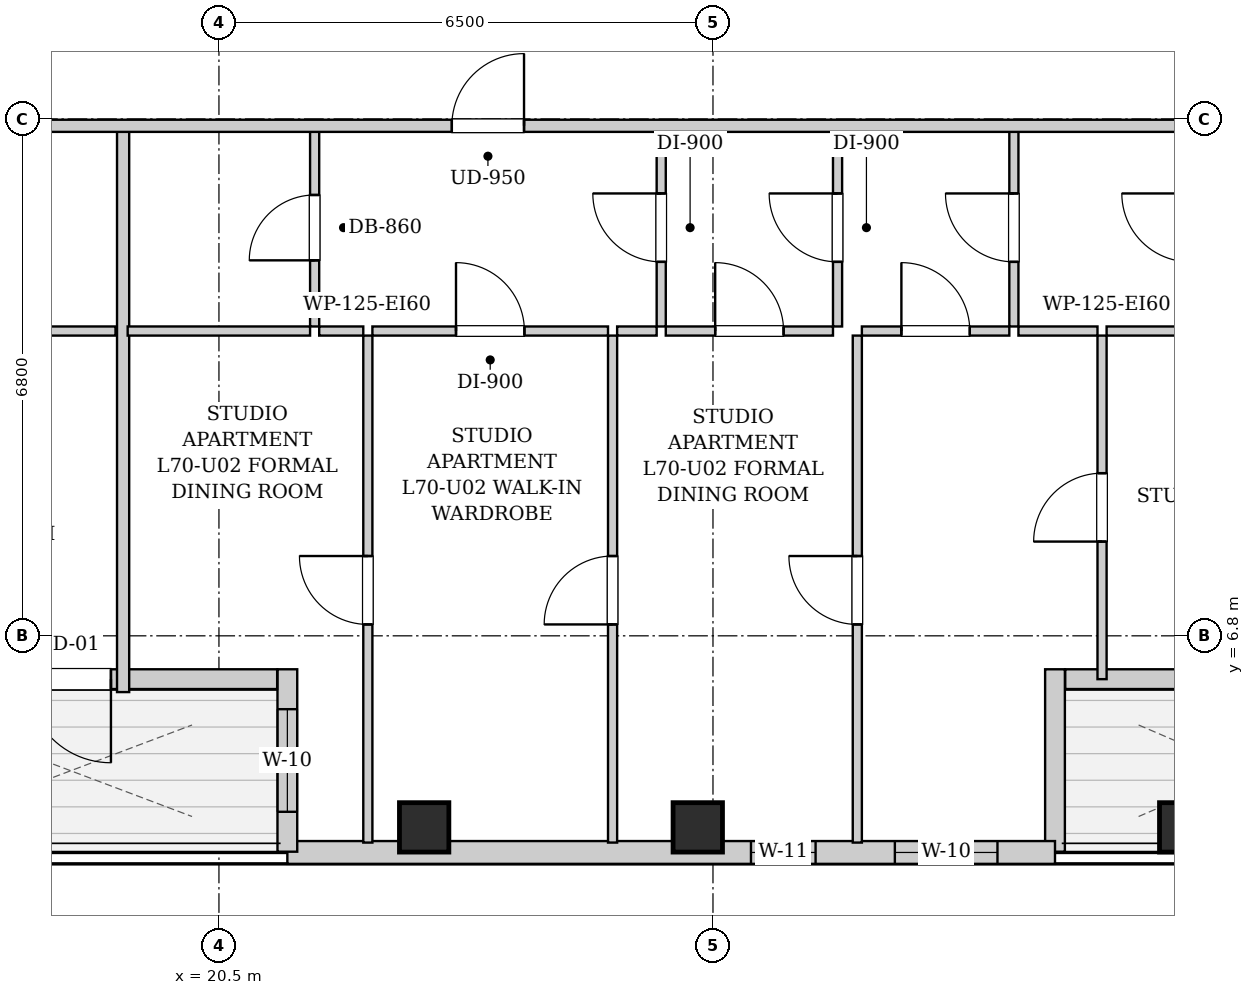
"""IFC4 building model, lengths in metres.
Left out: names, types, materials, properties, quantities, classifications, styles, units other than length and angle.
Written with IfcOpenShell. Run it as: python <this file> out.ifc"""

import sys

from ifc_helpers import new_model, si_unit, direction, frame, frame_2d, origin, origin_2d, place, context, subcontext, project, spatial, rectangle, extrude, element, fill, save


model = new_model("IFC4")
c1 = context("Model", 3, precision=1e-05, world=origin(), true_north=direction((0.0, 1.0)))
c2 = subcontext(c1, "Body", "Model", "MODEL_VIEW")
j1 = project(units=[si_unit("LENGTHUNIT", "METRE"), si_unit("PLANEANGLEUNIT", "RADIAN")], contexts=[c1])
p1 = place(None, origin())
s1 = spatial("IfcSite", under=j1, at=p1, CompositionType="ELEMENT")
p2 = place(p1, origin())
s2 = spatial("IfcBuilding", under=s1, at=p2, CompositionType="ELEMENT")
p3 = place(p2, frame((0.0, 0.0, 241.1)))
s3 = spatial("IfcBuildingStorey", under=s2, at=p3, CompositionType="ELEMENT", Elevation=241.1)
for number, where, z_axis, x_axis in (
    (1, (23.2, 4.28, 0.0), (0.0, 0.0, 1.0), (1.0, 0.0, 0.0)),
    (2, (26.8, 4.28, 0.0), (0.0, 0.0, 1.0), (1.0, 0.0, 0.0)),
    (3, (33.2, 4.28, 0.0), (0.0, 0.0, 1.0), (1.0, 0.0, 0.0)),
):
    element("IfcColumn", number, at=place(p3, frame(where, z_axis=z_axis, x_axis=x_axis)), inside=s3, PredefinedType="COLUMN", context=c2, shape_type="SweptSolid", body=[
        extrude(rectangle(XDim=0.65, YDim=0.65, at=origin_2d()), origin(), (0.0, 0.0, 1.0), 3.4),
    ])
p4 = place(p3, frame((36.366, 6.23, 0.0), z_axis=(0.0, 0.0, 1.0), x_axis=(-1.0, 0.0, 0.0)))
e4 = element("IfcWall", 4, at=p4, inside=s3, PredefinedType="SOLIDWALL", context=c2, shape_type="SweptSolid", body=[
    extrude(rectangle(XDim=4.732, YDim=0.26, at=frame_2d((2.366, 0.0))), origin(), (0.0, 0.0, 1.0), 3.14),
])
p5 = place(p4, frame((1.816, 0.0, 0.0)))
e5 = element("IfcOpeningElement", 5, at=p5, cuts=e4, PredefinedType="OPENING", context=c2, shape_type="SweptSolid", body=[
    extrude(rectangle(XDim=1.1, YDim=2.0, at=frame_2d((0.55, 1.0))), frame((0.0, 0.14, 0.0), z_axis=(0.0, -1.0, 0.0), x_axis=(1.0, 0.0, 0.0)), (0.0, 0.0, 1.0), 0.28),
])
p6 = place(p3, frame((31.5, 6.36, 0.0), z_axis=(0.0, 0.0, 1.0), x_axis=(0.0, -1.0, 0.0)))
e6 = element("IfcWall", 6, at=p6, inside=s3, PredefinedType="SOLIDWALL", context=c2, shape_type="SweptSolid", body=[
    extrude(rectangle(XDim=2.4, YDim=0.26, at=frame_2d((1.2, 0.0))), origin(), (0.0, 0.0, 1.0), 3.14),
])
p7 = place(p3, frame((31.5, 3.95, 0.0), z_axis=(0.0, 0.0, 1.0), x_axis=(-1.0, 0.0, 0.0)))
e7 = element("IfcWall", 7, at=p7, inside=s3, PredefinedType="SOLIDWALL", context=c2, shape_type="SweptSolid", body=[
    extrude(rectangle(XDim=10.1, YDim=0.3, at=frame_2d((5.05, 0.0))), origin(), (0.0, 0.0, 1.0), 3.14),
])
p8 = place(p7, frame((3.15, 0.0, 0.55)))
e8 = element("IfcOpeningElement", 8, at=p8, cuts=e7, PredefinedType="OPENING", context=c2, shape_type="SweptSolid", body=[
    extrude(rectangle(XDim=0.85, YDim=1.2, at=frame_2d((0.425, 0.6))), frame((0.0, 0.16, 0.0), z_axis=(0.0, -1.0, 0.0), x_axis=(1.0, 0.0, 0.0)), (0.0, 0.0, 1.0), 0.32),
])
p9 = place(p7, frame((0.757, 0.0, 0.55)))
e9 = element("IfcOpeningElement", 9, at=p9, cuts=e7, PredefinedType="OPENING", context=c2, shape_type="SweptSolid", body=[
    extrude(rectangle(XDim=1.35, YDim=1.2, at=frame_2d((0.675, 0.6))), frame((0.0, 0.16, 0.0), z_axis=(0.0, -1.0, 0.0), x_axis=(1.0, 0.0, 0.0)), (0.0, 0.0, 1.0), 0.32),
])
p10 = place(p3, frame((21.4, 3.96, 0.0), z_axis=(0.0, 0.0, 1.0), x_axis=(0.0, 1.0, 0.0)))
e10 = element("IfcWall", 10, at=p10, inside=s3, PredefinedType="SOLIDWALL", context=c2, shape_type="SweptSolid", body=[
    extrude(rectangle(XDim=2.4, YDim=0.26, at=frame_2d((1.2, 0.0))), origin(), (0.0, 0.0, 1.0), 3.14),
])
p11 = place(p10, frame((0.525, 0.0, 0.55)))
e11 = element("IfcOpeningElement", 11, at=p11, cuts=e10, PredefinedType="OPENING", context=c2, shape_type="SweptSolid", body=[
    extrude(rectangle(XDim=1.35, YDim=1.2, at=frame_2d((0.675, 0.6))), frame((0.0, 0.14, 0.0), z_axis=(0.0, -1.0, 0.0), x_axis=(1.0, 0.0, 0.0)), (0.0, 0.0, 1.0), 0.28),
])
p12 = place(p3, frame((21.266, 6.23, 0.0), z_axis=(0.0, 0.0, 1.0), x_axis=(-1.0, 0.0, 0.0)))
e12 = element("IfcWall", 12, at=p12, inside=s3, PredefinedType="SOLIDWALL", context=c2, shape_type="SweptSolid", body=[
    extrude(rectangle(XDim=5.432, YDim=0.26, at=frame_2d((2.716, 0.0))), origin(), (0.0, 0.0, 1.0), 3.14),
])
p13 = place(p12, frame((2.187, 0.0, 0.0)))
e13 = element("IfcOpeningElement", 13, at=p13, cuts=e12, PredefinedType="OPENING", context=c2, shape_type="SweptSolid", body=[
    extrude(rectangle(XDim=1.1, YDim=2.0, at=frame_2d((0.55, 1.0))), frame((0.0, 0.14, 0.0), z_axis=(0.0, -1.0, 0.0), x_axis=(1.0, 0.0, 0.0)), (0.0, 0.0, 1.0), 0.28),
])
p14 = place(p3, frame((15.15, 10.81, 0.0), z_axis=(0.0, 0.0, 1.0), x_axis=(1.0, 0.0, 0.0)))
e14 = element("IfcWall", 14, at=p14, inside=s3, PredefinedType="PARTITIONING", context=c2, shape_type="SweptSolid", body=[
    extrude(rectangle(XDim=3.989, YDim=0.12, at=frame_2d((1.995, 0.0))), origin(), (0.0, 0.0, 1.0), 3.14),
])
p15 = place(p14, frame((1.544, 0.0, 0.0)))
e15 = element("IfcOpeningElement", 15, at=p15, cuts=e14, PredefinedType="OPENING", context=c2, shape_type="SweptSolid", body=[
    extrude(rectangle(XDim=0.9, YDim=2.05, at=frame_2d((0.45, 1.025))), frame((0.0, 0.07, 0.0), z_axis=(0.0, -1.0, 0.0), x_axis=(1.0, 0.0, 0.0)), (0.0, 0.0, 1.0), 0.14),
])
p16 = place(p3, frame((19.239, 6.06, 0.0), z_axis=(0.0, 0.0, 1.0), x_axis=(0.0, 1.0, 0.0)))
e16 = element("IfcWall", 16, at=p16, inside=s3, PredefinedType="PARTITIONING", context=c2, shape_type="SweptSolid", body=[
    extrude(rectangle(XDim=7.41, YDim=0.16, at=frame_2d((3.705, 0.0))), origin(), (0.0, 0.0, 1.0), 3.14),
])
p17 = place(p3, frame((21.759, 10.87, 0.0), z_axis=(0.0, 0.0, 1.0), x_axis=(0.0, 1.0, 0.0)))
e17 = element("IfcWall", 17, at=p17, inside=s3, PredefinedType="PARTITIONING", context=c2, shape_type="SweptSolid", body=[
    extrude(rectangle(XDim=2.6, YDim=0.12, at=frame_2d((1.3, 0.0))), origin(), (0.0, 0.0, 1.0), 3.14),
])
p18 = place(p17, frame((0.87, 0.0, 0.0)))
e18 = element("IfcOpeningElement", 18, at=p18, cuts=e17, PredefinedType="OPENING", context=c2, shape_type="SweptSolid", body=[
    extrude(rectangle(XDim=0.86, YDim=2.05, at=frame_2d((0.43, 1.025))), frame((0.0, 0.07, 0.0), z_axis=(0.0, -1.0, 0.0), x_axis=(1.0, 0.0, 0.0)), (0.0, 0.0, 1.0), 0.14),
])
p19 = place(p3, frame((19.299, 10.81, 0.0), z_axis=(0.0, 0.0, 1.0), x_axis=(1.0, 0.0, 0.0)))
e19 = element("IfcWall", 19, at=p19, inside=s3, PredefinedType="PARTITIONING", context=c2, shape_type="SweptSolid", body=[
    extrude(rectangle(XDim=2.4, YDim=0.12, at=frame_2d((1.2, 0.0))), origin(), (0.0, 0.0, 1.0), 3.14),
])
p20 = place(p3, frame((26.319, 10.87, 0.0), z_axis=(0.0, 0.0, 1.0), x_axis=(0.0, 1.0, 0.0)))
e20 = element("IfcWall", 20, at=p20, inside=s3, PredefinedType="PARTITIONING", context=c2, shape_type="SweptSolid", body=[
    extrude(rectangle(XDim=2.6, YDim=0.12, at=frame_2d((1.3, 0.0))), origin(), (0.0, 0.0, 1.0), 3.14),
])
p21 = place(p20, frame((0.85, 0.0, 0.0)))
e21 = element("IfcOpeningElement", 21, at=p21, cuts=e20, PredefinedType="OPENING", context=c2, shape_type="SweptSolid", body=[
    extrude(rectangle(XDim=0.9, YDim=2.05, at=frame_2d((0.45, 1.025))), frame((0.0, 0.07, 0.0), z_axis=(0.0, -1.0, 0.0), x_axis=(1.0, 0.0, 0.0)), (0.0, 0.0, 1.0), 0.14),
])
p22 = place(p3, frame((21.819, 10.81, 0.0), z_axis=(0.0, 0.0, 1.0), x_axis=(1.0, 0.0, 0.0)))
e22 = element("IfcWall", 22, at=p22, inside=s3, PredefinedType="PARTITIONING", context=c2, shape_type="SweptSolid", body=[
    extrude(rectangle(XDim=0.58, YDim=0.12, at=frame_2d((0.29, 0.0))), origin(), (0.0, 0.0, 1.0), 3.14),
])
p23 = place(p3, frame((22.519, 10.81, 0.0), z_axis=(0.0, 0.0, 1.0), x_axis=(1.0, 0.0, 0.0)))
e23 = element("IfcWall", 23, at=p23, inside=s3, PredefinedType="PARTITIONING", context=c2, shape_type="SweptSolid", body=[
    extrude(rectangle(XDim=3.1, YDim=0.12, at=frame_2d((1.55, 0.0))), origin(), (0.0, 0.0, 1.0), 3.14),
])
p24 = place(p23, frame((1.1, 0.0, 0.0)))
e24 = element("IfcOpeningElement", 24, at=p24, cuts=e23, PredefinedType="OPENING", context=c2, shape_type="SweptSolid", body=[
    extrude(rectangle(XDim=0.9, YDim=2.05, at=frame_2d((0.45, 1.025))), frame((0.0, 0.07, 0.0), z_axis=(0.0, -1.0, 0.0), x_axis=(1.0, 0.0, 0.0)), (0.0, 0.0, 1.0), 0.14),
])
p25 = place(p3, frame((25.739, 10.81, 0.0), z_axis=(0.0, 0.0, 1.0), x_axis=(1.0, 0.0, 0.0)))
e25 = element("IfcWall", 25, at=p25, inside=s3, PredefinedType="PARTITIONING", context=c2, shape_type="SweptSolid", body=[
    extrude(rectangle(XDim=0.52, YDim=0.12, at=frame_2d((0.26, 0.0))), origin(), (0.0, 0.0, 1.0), 3.14),
])
p26 = place(p3, frame((28.639, 10.87, 0.0), z_axis=(0.0, 0.0, 1.0), x_axis=(0.0, 1.0, 0.0)))
e26 = element("IfcWall", 26, at=p26, inside=s3, PredefinedType="PARTITIONING", context=c2, shape_type="SweptSolid", body=[
    extrude(rectangle(XDim=2.6, YDim=0.12, at=frame_2d((1.3, 0.0))), origin(), (0.0, 0.0, 1.0), 3.14),
])
p27 = place(p26, frame((0.85, 0.0, 0.0)))
e27 = element("IfcOpeningElement", 27, at=p27, cuts=e26, PredefinedType="OPENING", context=c2, shape_type="SweptSolid", body=[
    extrude(rectangle(XDim=0.9, YDim=2.05, at=frame_2d((0.45, 1.025))), frame((0.0, 0.07, 0.0), z_axis=(0.0, -1.0, 0.0), x_axis=(1.0, 0.0, 0.0)), (0.0, 0.0, 1.0), 0.14),
])
p28 = place(p3, frame((26.379, 10.81, 0.0), z_axis=(0.0, 0.0, 1.0), x_axis=(1.0, 0.0, 0.0)))
e28 = element("IfcWall", 28, at=p28, inside=s3, PredefinedType="PARTITIONING", context=c2, shape_type="SweptSolid", body=[
    extrude(rectangle(XDim=2.2, YDim=0.12, at=frame_2d((1.1, 0.0))), origin(), (0.0, 0.0, 1.0), 3.14),
])
p29 = place(p28, frame((0.65, 0.0, 0.0)))
e29 = element("IfcOpeningElement", 29, at=p29, cuts=e28, PredefinedType="OPENING", context=c2, shape_type="SweptSolid", body=[
    extrude(rectangle(XDim=0.9, YDim=2.05, at=frame_2d((0.45, 1.025))), frame((0.0, 0.07, 0.0), z_axis=(0.0, -1.0, 0.0), x_axis=(1.0, 0.0, 0.0)), (0.0, 0.0, 1.0), 0.14),
])
p30 = place(p3, frame((30.959, 10.87, 0.0), z_axis=(0.0, 0.0, 1.0), x_axis=(0.0, 1.0, 0.0)))
e30 = element("IfcWall", 30, at=p30, inside=s3, PredefinedType="PARTITIONING", context=c2, shape_type="SweptSolid", body=[
    extrude(rectangle(XDim=2.6, YDim=0.12, at=frame_2d((1.3, 0.0))), origin(), (0.0, 0.0, 1.0), 3.14),
])
p31 = place(p30, frame((0.85, 0.0, 0.0)))
e31 = element("IfcOpeningElement", 31, at=p31, cuts=e30, PredefinedType="OPENING", context=c2, shape_type="SweptSolid", body=[
    extrude(rectangle(XDim=0.9, YDim=2.05, at=frame_2d((0.45, 1.025))), frame((0.0, 0.07, 0.0), z_axis=(0.0, -1.0, 0.0), x_axis=(1.0, 0.0, 0.0)), (0.0, 0.0, 1.0), 0.14),
])
p32 = place(p3, frame((28.959, 10.81, 0.0), z_axis=(0.0, 0.0, 1.0), x_axis=(1.0, 0.0, 0.0)))
e32 = element("IfcWall", 32, at=p32, inside=s3, PredefinedType="PARTITIONING", context=c2, shape_type="SweptSolid", body=[
    extrude(rectangle(XDim=1.94, YDim=0.12, at=frame_2d((0.97, 0.0))), origin(), (0.0, 0.0, 1.0), 3.14),
])
p33 = place(p32, frame((0.52, 0.0, 0.0)))
e33 = element("IfcOpeningElement", 33, at=p33, cuts=e32, PredefinedType="OPENING", context=c2, shape_type="SweptSolid", body=[
    extrude(rectangle(XDim=0.9, YDim=2.05, at=frame_2d((0.45, 1.025))), frame((0.0, 0.07, 0.0), z_axis=(0.0, -1.0, 0.0), x_axis=(1.0, 0.0, 0.0)), (0.0, 0.0, 1.0), 0.14),
])
for number, where, z_axis, x_axis in (
    (34, (31.019, 10.81, 0.0), (0.0, 0.0, 1.0), (1.0, 0.0, 0.0)),
    (35, (32.179, 10.81, 0.0), (0.0, 0.0, 1.0), (1.0, 0.0, 0.0)),
):
    element("IfcWall", number, at=place(p3, frame(where, z_axis=z_axis, x_axis=x_axis)), inside=s3, PredefinedType="PARTITIONING", context=c2, shape_type="SweptSolid", body=[
        extrude(rectangle(XDim=1.04, YDim=0.12, at=frame_2d((0.52, 0.0))), origin(), (0.0, 0.0, 1.0), 3.14),
    ])
p34 = place(p3, frame((22.459, 4.08, 0.0), z_axis=(0.0, 0.0, 1.0), x_axis=(0.0, 1.0, 0.0)))
e36 = element("IfcWall", 36, at=p34, inside=s3, PredefinedType="PARTITIONING", context=c2, shape_type="SweptSolid", body=[
    extrude(rectangle(XDim=6.67, YDim=0.12, at=frame_2d((3.335, 0.0))), origin(), (0.0, 0.0, 1.0), 3.14),
])
p35 = place(p34, frame((2.87, 0.0, 0.0)))
e37 = element("IfcOpeningElement", 37, at=p35, cuts=e36, PredefinedType="OPENING", context=c2, shape_type="SweptSolid", body=[
    extrude(rectangle(XDim=0.9, YDim=2.05, at=frame_2d((0.45, 1.025))), frame((0.0, 0.07, 0.0), z_axis=(0.0, -1.0, 0.0), x_axis=(1.0, 0.0, 0.0)), (0.0, 0.0, 1.0), 0.14),
])
p36 = place(p3, frame((25.679, 4.08, 0.0), z_axis=(0.0, 0.0, 1.0), x_axis=(0.0, 1.0, 0.0)))
e38 = element("IfcWall", 38, at=p36, inside=s3, PredefinedType="PARTITIONING", context=c2, shape_type="SweptSolid", body=[
    extrude(rectangle(XDim=6.67, YDim=0.12, at=frame_2d((3.335, 0.0))), origin(), (0.0, 0.0, 1.0), 3.14),
])
p37 = place(p36, frame((2.87, 0.0, 0.0)))
e39 = element("IfcOpeningElement", 39, at=p37, cuts=e38, PredefinedType="OPENING", context=c2, shape_type="SweptSolid", body=[
    extrude(rectangle(XDim=0.9, YDim=2.05, at=frame_2d((0.45, 1.025))), frame((0.0, 0.07, 0.0), z_axis=(0.0, -1.0, 0.0), x_axis=(1.0, 0.0, 0.0)), (0.0, 0.0, 1.0), 0.14),
])
p38 = place(p3, frame((28.899, 4.08, 0.0), z_axis=(0.0, 0.0, 1.0), x_axis=(0.0, 1.0, 0.0)))
e40 = element("IfcWall", 40, at=p38, inside=s3, PredefinedType="PARTITIONING", context=c2, shape_type="SweptSolid", body=[
    extrude(rectangle(XDim=6.67, YDim=0.12, at=frame_2d((3.335, 0.0))), origin(), (0.0, 0.0, 1.0), 3.14),
])
p39 = place(p38, frame((2.87, 0.0, 0.0)))
e41 = element("IfcOpeningElement", 41, at=p39, cuts=e40, PredefinedType="OPENING", context=c2, shape_type="SweptSolid", body=[
    extrude(rectangle(XDim=0.9, YDim=2.05, at=frame_2d((0.45, 1.025))), frame((0.0, 0.07, 0.0), z_axis=(0.0, -1.0, 0.0), x_axis=(1.0, 0.0, 0.0)), (0.0, 0.0, 1.0), 0.14),
])
p40 = place(p3, frame((32.119, 6.23, 0.0), z_axis=(0.0, 0.0, 1.0), x_axis=(0.0, 1.0, 0.0)))
e42 = element("IfcWall", 42, at=p40, inside=s3, PredefinedType="PARTITIONING", context=c2, shape_type="SweptSolid", body=[
    extrude(rectangle(XDim=4.52, YDim=0.12, at=frame_2d((2.26, 0.0))), origin(), (0.0, 0.0, 1.0), 3.14),
])
p41 = place(p40, frame((1.81, 0.0, 0.0)))
e43 = element("IfcOpeningElement", 43, at=p41, cuts=e42, PredefinedType="OPENING", context=c2, shape_type="SweptSolid", body=[
    extrude(rectangle(XDim=0.9, YDim=2.05, at=frame_2d((0.45, 1.025))), frame((0.0, 0.07, 0.0), z_axis=(0.0, -1.0, 0.0), x_axis=(1.0, 0.0, 0.0)), (0.0, 0.0, 1.0), 0.14),
])
p42 = place(p3, frame((13.15, 13.51, 0.0), z_axis=(0.0, 0.0, 1.0), x_axis=(1.0, 0.0, 0.0)))
e44 = element("IfcWall", 44, at=p42, inside=s3, PredefinedType="PARTITIONING", context=c2, shape_type="SweptSolid", body=[
    extrude(rectangle(XDim=24.6, YDim=0.16, at=frame_2d((12.3, 0.0))), origin(), (0.0, 0.0, 1.0), 3.14),
])
p43 = place(p42, frame((3.165, 0.0, 0.0)))
e45 = element("IfcOpeningElement", 45, at=p43, cuts=e44, PredefinedType="OPENING", context=c2, shape_type="SweptSolid", body=[
    extrude(rectangle(XDim=0.95, YDim=2.1, at=frame_2d((0.475, 1.05))), frame((0.0, 0.09, 0.0), z_axis=(0.0, -1.0, 0.0), x_axis=(1.0, 0.0, 0.0)), (0.0, 0.0, 1.0), 0.18),
])
p44 = place(p42, frame((10.414, 0.0, 0.0)))
e46 = element("IfcOpeningElement", 46, at=p44, cuts=e44, PredefinedType="OPENING", context=c2, shape_type="SweptSolid", body=[
    extrude(rectangle(XDim=0.95, YDim=2.1, at=frame_2d((0.475, 1.05))), frame((0.0, 0.09, 0.0), z_axis=(0.0, -1.0, 0.0), x_axis=(1.0, 0.0, 0.0)), (0.0, 0.0, 1.0), 0.18),
])
p45 = place(p18, origin())
e47 = element("IfcDoor", 47, at=p45, inside=s3, OperationType="SINGLE_SWING_LEFT", PredefinedType="DOOR", context=c2, shape_type="SweptSolid", body=[
    extrude(rectangle(XDim=0.86, YDim=2.05, at=frame_2d((0.43, 1.025))), frame((0.0, 0.025, 0.0), z_axis=(0.0, -1.0, 0.0), x_axis=(1.0, 0.0, 0.0)), (0.0, 0.0, 1.0), 0.05),
])
fill(e18, e47)
p46 = place(p21, origin())
e48 = element("IfcDoor", 48, at=p46, inside=s3, OperationType="SINGLE_SWING_RIGHT", PredefinedType="DOOR", context=c2, shape_type="SweptSolid", body=[
    extrude(rectangle(XDim=0.9, YDim=2.05, at=frame_2d((0.45, 1.025))), frame((0.0, 0.025, 0.0), z_axis=(0.0, -1.0, 0.0), x_axis=(1.0, 0.0, 0.0)), (0.0, 0.0, 1.0), 0.05),
])
fill(e21, e48)
p47 = place(p24, origin())
e49 = element("IfcDoor", 49, at=p47, inside=s3, OperationType="SINGLE_SWING_LEFT", PredefinedType="DOOR", context=c2, shape_type="SweptSolid", body=[
    extrude(rectangle(XDim=0.9, YDim=2.05, at=frame_2d((0.45, 1.025))), frame((0.0, 0.025, 0.0), z_axis=(0.0, -1.0, 0.0), x_axis=(1.0, 0.0, 0.0)), (0.0, 0.0, 1.0), 0.05),
])
fill(e24, e49)
p48 = place(p27, origin())
e50 = element("IfcDoor", 50, at=p48, inside=s3, OperationType="SINGLE_SWING_RIGHT", PredefinedType="DOOR", context=c2, shape_type="SweptSolid", body=[
    extrude(rectangle(XDim=0.9, YDim=2.05, at=frame_2d((0.45, 1.025))), frame((0.0, 0.025, 0.0), z_axis=(0.0, -1.0, 0.0), x_axis=(1.0, 0.0, 0.0)), (0.0, 0.0, 1.0), 0.05),
])
fill(e27, e50)
p49 = place(p29, origin())
e51 = element("IfcDoor", 51, at=p49, inside=s3, OperationType="SINGLE_SWING_LEFT", PredefinedType="DOOR", context=c2, shape_type="SweptSolid", body=[
    extrude(rectangle(XDim=0.9, YDim=2.05, at=frame_2d((0.45, 1.025))), frame((0.0, 0.025, 0.0), z_axis=(0.0, -1.0, 0.0), x_axis=(1.0, 0.0, 0.0)), (0.0, 0.0, 1.0), 0.05),
])
fill(e29, e51)
p50 = place(p31, origin())
e52 = element("IfcDoor", 52, at=p50, inside=s3, OperationType="SINGLE_SWING_RIGHT", PredefinedType="DOOR", context=c2, shape_type="SweptSolid", body=[
    extrude(rectangle(XDim=0.9, YDim=2.05, at=frame_2d((0.45, 1.025))), frame((0.0, 0.025, 0.0), z_axis=(0.0, -1.0, 0.0), x_axis=(1.0, 0.0, 0.0)), (0.0, 0.0, 1.0), 0.05),
])
fill(e31, e52)
p51 = place(p33, origin())
e53 = element("IfcDoor", 53, at=p51, inside=s3, OperationType="SINGLE_SWING_LEFT", PredefinedType="DOOR", context=c2, shape_type="SweptSolid", body=[
    extrude(rectangle(XDim=0.9, YDim=2.05, at=frame_2d((0.45, 1.025))), frame((0.0, 0.025, 0.0), z_axis=(0.0, -1.0, 0.0), x_axis=(1.0, 0.0, 0.0)), (0.0, 0.0, 1.0), 0.05),
])
fill(e33, e53)
p52 = place(p35, origin())
e54 = element("IfcDoor", 54, at=p52, inside=s3, OperationType="SINGLE_SWING_RIGHT", PredefinedType="DOOR", context=c2, shape_type="SweptSolid", body=[
    extrude(rectangle(XDim=0.9, YDim=2.05, at=frame_2d((0.45, 1.025))), frame((0.0, 0.025, 0.0), z_axis=(0.0, -1.0, 0.0), x_axis=(1.0, 0.0, 0.0)), (0.0, 0.0, 1.0), 0.05),
])
fill(e37, e54)
p53 = place(p37, origin())
e55 = element("IfcDoor", 55, at=p53, inside=s3, OperationType="SINGLE_SWING_LEFT", PredefinedType="DOOR", context=c2, shape_type="SweptSolid", body=[
    extrude(rectangle(XDim=0.9, YDim=2.05, at=frame_2d((0.45, 1.025))), frame((0.0, 0.025, 0.0), z_axis=(0.0, -1.0, 0.0), x_axis=(1.0, 0.0, 0.0)), (0.0, 0.0, 1.0), 0.05),
])
fill(e39, e55)
p54 = place(p39, origin())
e56 = element("IfcDoor", 56, at=p54, inside=s3, OperationType="SINGLE_SWING_RIGHT", PredefinedType="DOOR", context=c2, shape_type="SweptSolid", body=[
    extrude(rectangle(XDim=0.9, YDim=2.05, at=frame_2d((0.45, 1.025))), frame((0.0, 0.025, 0.0), z_axis=(0.0, -1.0, 0.0), x_axis=(1.0, 0.0, 0.0)), (0.0, 0.0, 1.0), 0.05),
])
fill(e41, e56)
p55 = place(p41, origin())
e57 = element("IfcDoor", 57, at=p55, inside=s3, OperationType="SINGLE_SWING_LEFT", PredefinedType="DOOR", context=c2, shape_type="SweptSolid", body=[
    extrude(rectangle(XDim=0.9, YDim=2.05, at=frame_2d((0.45, 1.025))), frame((0.0, 0.025, 0.0), z_axis=(0.0, -1.0, 0.0), x_axis=(1.0, 0.0, 0.0)), (0.0, 0.0, 1.0), 0.05),
])
fill(e43, e57)
p56 = place(p44, origin())
e58 = element("IfcDoor", 58, at=p56, inside=s3, OperationType="SINGLE_SWING_RIGHT", PredefinedType="DOOR", context=c2, shape_type="SweptSolid", body=[
    extrude(rectangle(XDim=0.95, YDim=2.1, at=frame_2d((0.475, 1.05))), frame((0.0, 0.025, 0.0), z_axis=(0.0, -1.0, 0.0), x_axis=(1.0, 0.0, 0.0)), (0.0, 0.0, 1.0), 0.05),
])
fill(e46, e58)
p57 = place(p13, origin())
e59 = element("IfcDoor", 59, at=p57, inside=s3, OperationType="SINGLE_SWING_LEFT", PredefinedType="DOOR", context=c2, shape_type="SweptSolid", body=[
    extrude(rectangle(XDim=1.1, YDim=2.0, at=frame_2d((0.55, 1.0))), frame((0.0, 0.025, 0.0), z_axis=(0.0, -1.0, 0.0), x_axis=(1.0, 0.0, 0.0)), (0.0, 0.0, 1.0), 0.05),
])
fill(e13, e59)
p58 = place(p11, origin())
e60 = element("IfcWindow", 60, at=p58, inside=s3, PartitioningType="SINGLE_PANEL", PredefinedType="WINDOW", context=c2, shape_type="SweptSolid", body=[
    extrude(rectangle(XDim=1.35, YDim=1.2, at=frame_2d((0.675, 0.6))), frame((0.0, 0.03, 0.0), z_axis=(0.0, -1.0, 0.0), x_axis=(1.0, 0.0, 0.0)), (0.0, 0.0, 1.0), 0.06),
])
fill(e11, e60)
p59 = place(p8, origin())
e61 = element("IfcWindow", 61, at=p59, inside=s3, PartitioningType="SINGLE_PANEL", PredefinedType="WINDOW", context=c2, shape_type="SweptSolid", body=[
    extrude(rectangle(XDim=0.85, YDim=1.2, at=frame_2d((0.425, 0.6))), frame((0.0, 0.03, 0.0), z_axis=(0.0, -1.0, 0.0), x_axis=(1.0, 0.0, 0.0)), (0.0, 0.0, 1.0), 0.06),
])
fill(e8, e61)
p60 = place(p9, origin())
e62 = element("IfcWindow", 62, at=p60, inside=s3, PartitioningType="SINGLE_PANEL", PredefinedType="WINDOW", context=c2, shape_type="SweptSolid", body=[
    extrude(rectangle(XDim=1.35, YDim=1.2, at=frame_2d((0.675, 0.6))), frame((0.0, 0.03, 0.0), z_axis=(0.0, -1.0, 0.0), x_axis=(1.0, 0.0, 0.0)), (0.0, 0.0, 1.0), 0.06),
])
fill(e9, e62)
save(model, sys.argv[1])
